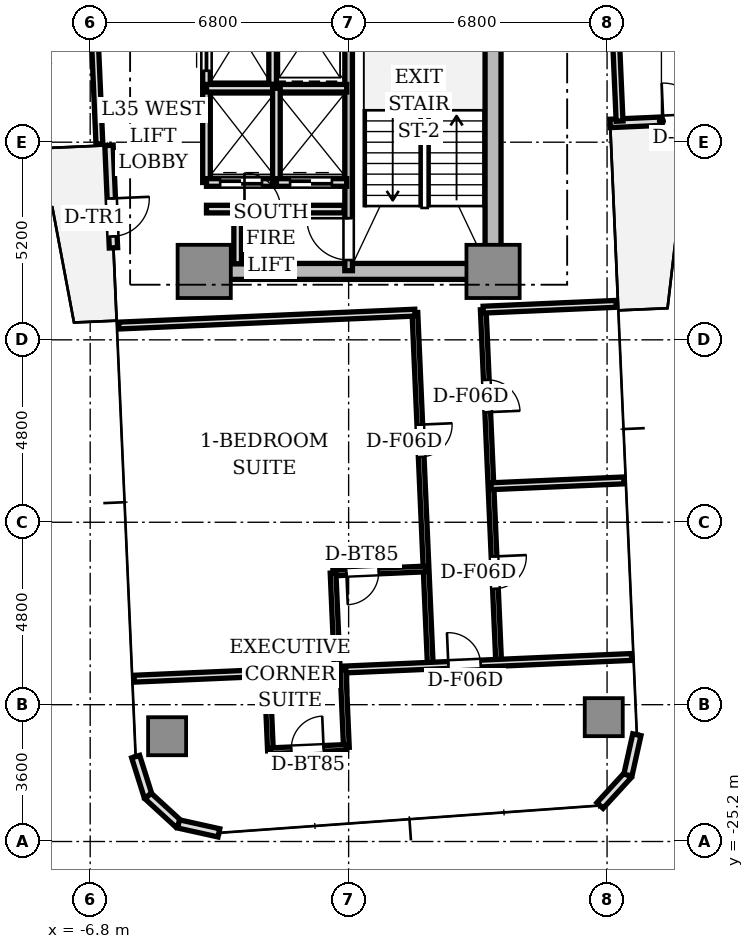
"""IFC4 building model, lengths in metres.
Left out: names, types, materials, properties, quantities, classifications, styles, units other than length and angle.
Written with IfcOpenShell. Run it as: python <this file> out.ifc"""

import sys

from ifc_helpers import new_model, si_unit, direction, frame, frame_2d, origin, origin_2d, place, context, subcontext, project, spatial, rectangle, extrude, source, transform, mapped, element, fill, save


model = new_model("IFC4")
c1 = context("Model", 3, precision=1e-05, world=origin(), true_north=direction((0.0, 1.0)))
c2 = subcontext(c1, "Body", "Model", "MODEL_VIEW")
j1 = project(units=[si_unit("LENGTHUNIT", "METRE"), si_unit("PLANEANGLEUNIT", "RADIAN")], contexts=[c1])
p1 = place(None, origin())
s1 = spatial("IfcSite", under=j1, at=p1, CompositionType="ELEMENT")
p2 = place(p1, origin())
s2 = spatial("IfcBuilding", under=s1, at=p2, CompositionType="ELEMENT")
p3 = place(p2, frame((0.0, 0.0, 128.2)))
s3 = spatial("IfcBuildingStorey", under=s2, at=p3, CompositionType="ELEMENT", Elevation=128.2)
p4 = place(p3, frame((-3.55, -10.2, 0.0), z_axis=(0.0, 0.0, 1.0), x_axis=(1.0, 0.0, 0.0)))
e1 = element("IfcWall", 1, at=p4, inside=s3, PredefinedType="SHEAR", context=c2, shape_type="SweptSolid", body=[
    extrude(rectangle(XDim=7.1, YDim=0.42, at=frame_2d((3.55, 0.0))), origin(), (0.0, 0.0, 1.0), 3.11),
])
p5 = place(p3, frame((3.8, -9.75, 0.0), z_axis=(0.0, 0.0, 1.0), x_axis=(0.0, 1.0, 0.0)))
e2 = element("IfcWall", 2, at=p5, inside=s3, PredefinedType="SHEAR", context=c2, shape_type="SweptSolid", body=[
    extrude(rectangle(XDim=6.9, YDim=0.42, at=frame_2d((3.45, 0.0))), origin(), (0.0, 0.0, 1.0), 3.11),
])
m1 = source(origin(), c2, "Body", "SweptSolid", [
    extrude(rectangle(XDim=1.4, YDim=1.4, at=origin_2d()), origin(), (0.0, 0.0, 1.0), 3.11),
])
for number, where, z_axis, x_axis in (
    (3, (-3.8, -10.2, 0.0), (0.0, 0.0, 1.0), (1.0, 0.0, 0.0)),
    (4, (3.8, -10.2, 0.0), (0.0, 0.0, 1.0), (1.0, 0.0, 0.0)),
):
    element("IfcColumn", number, at=place(p3, frame(where, z_axis=z_axis, x_axis=x_axis)), inside=s3, PredefinedType="COLUMN", context=c2, shape_type="MappedRepresentation", body=[
        mapped(m1, transform((0.0, 0.0, 0.0), scale=1.0)),
    ])
m2 = source(origin(), c2, "Body", "SweptSolid", [
    extrude(rectangle(XDim=1.0, YDim=1.0, at=origin_2d()), origin(), (0.0, 0.0, 1.0), 3.11),
])
for number, where, z_axis, x_axis in (
    (5, (-4.776, -22.43, 0.0), (0.0, 0.0, 1.0), (1.0, 0.0, 0.0)),
    (6, (6.713, -21.928, 0.0), (0.0, 0.0, 1.0), (1.0, 0.0, 0.0)),
):
    element("IfcColumn", number, at=place(p3, frame(where, z_axis=z_axis, x_axis=x_axis)), inside=s3, PredefinedType="COLUMN", context=c2, shape_type="MappedRepresentation", body=[
        mapped(m2, transform((0.0, 0.0, 0.0), scale=1.0)),
    ])
p6 = place(p3, frame((6.882, -6.306, 0.0), z_axis=(0.0, 0.0, 1.0), x_axis=(0.999045894436, 0.043672655174, 0.0)))
e7 = element("IfcWall", 7, at=p6, inside=s3, PredefinedType="STANDARD", context=c2, shape_type="SweptSolid", body=[
    extrude(rectangle(XDim=2.7, YDim=0.22, at=frame_2d((1.35, 0.0))), origin(), (0.0, 0.0, 1.0), 3.11),
])
p7 = place(p6, frame((1.4, 0.0, 0.0)))
e8 = element("IfcOpeningElement", 8, at=p7, cuts=e7, PredefinedType="OPENING", context=c2, shape_type="SweptSolid", body=[
    extrude(rectangle(XDim=1.0, YDim=2.2, at=frame_2d((0.5, 1.1))), frame((0.0, 0.12, 0.0), z_axis=(0.0, -1.0, 0.0), x_axis=(1.0, 0.0, 0.0)), (0.0, 0.0, 1.0), 0.24),
])
p8 = place(p3, frame((-6.306, -6.882, 0.0), z_axis=(0.0, 0.0, 1.0), x_axis=(0.043672655174, -0.999045894436, 0.0)))
e9 = element("IfcWall", 9, at=p8, inside=s3, PredefinedType="STANDARD", context=c2, shape_type="SweptSolid", body=[
    extrude(rectangle(XDim=2.7, YDim=0.22, at=frame_2d((1.35, 0.0))), origin(), (0.0, 0.0, 1.0), 3.11),
])
p9 = place(p8, frame((1.4, 0.0, 0.0)))
e10 = element("IfcOpeningElement", 10, at=p9, cuts=e9, PredefinedType="OPENING", context=c2, shape_type="SweptSolid", body=[
    extrude(rectangle(XDim=1.0, YDim=2.2, at=frame_2d((0.5, 1.1))), frame((0.0, 0.12, 0.0), z_axis=(0.0, -1.0, 0.0), x_axis=(1.0, 0.0, 0.0)), (0.0, 0.0, 1.0), 0.24),
])
p10 = place(p3, frame((-5.604, -22.966, 0.0), z_axis=(0.0, 0.0, 1.0), x_axis=(0.300755105707, -0.953701403161, 0.0)))
e11 = element("IfcWall", 11, at=p10, inside=s3, PredefinedType="STANDARD", context=c2, shape_type="SweptSolid", body=[
    extrude(rectangle(XDim=1.087, YDim=0.22, at=frame_2d((0.543, 0.0))), origin(), (0.0, 0.0, 1.0), 3.11),
])
p11 = place(p3, frame((-5.277, -24.003, 0.0), z_axis=(0.0, 0.0, 1.0), x_axis=(0.737312600672, -0.675551721847, 0.0)))
e12 = element("IfcWall", 12, at=p11, inside=s3, PredefinedType="STANDARD", context=c2, shape_type="SweptSolid", body=[
    extrude(rectangle(XDim=1.087, YDim=0.22, at=frame_2d((0.543, 0.0))), origin(), (0.0, 0.0, 1.0), 3.11),
])
for number, where, z_axis, x_axis in (
    (13, (-4.475, -24.737, 0.0), (0.0, 0.0, 1.0), (0.976, -0.217, 0.0)),
    (14, (6.614, -24.253, 0.0), (0.0, 0.0, 1.0), (0.676, 0.737, 0.0)),
):
    element("IfcWall", number, at=place(p3, frame(where, z_axis=z_axis, x_axis=x_axis)), inside=s3, PredefinedType="STANDARD", context=c2, shape_type="SweptSolid", body=[
        extrude(rectangle(XDim=1.087, YDim=0.22, at=frame_2d((0.543, 0.0))), origin(), (0.0, 0.0, 1.0), 3.11),
    ])
p12 = place(p3, frame((7.349, -23.452, 0.0), z_axis=(0.0, 0.0, 1.0), x_axis=(0.216454939174, 0.976292609471, 0.0)))
e15 = element("IfcWall", 15, at=p12, inside=s3, PredefinedType="STANDARD", context=c2, shape_type="SweptSolid", body=[
    extrude(rectangle(XDim=1.087, YDim=0.22, at=frame_2d((0.544, 0.0))), origin(), (0.0, 0.0, 1.0), 3.11),
])
p13 = place(p3, frame((0.0, -10.18, 0.0), z_axis=(0.0, 0.0, 1.0), x_axis=(0.0, 1.0, 0.0)))
e16 = element("IfcWall", 16, at=p13, inside=s3, PredefinedType="SOLIDWALL", context=c2, shape_type="SweptSolid", body=[
    extrude(rectangle(XDim=7.68, YDim=0.2, at=frame_2d((3.84, 0.0))), origin(), (0.0, 0.0, 1.0), 3.11),
])
p14 = place(p13, frame((0.28, 0.0, 0.0)))
e17 = element("IfcOpeningElement", 17, at=p14, cuts=e16, PredefinedType="OPENING", context=c2, shape_type="SweptSolid", body=[
    extrude(rectangle(XDim=1.1, YDim=2.15, at=frame_2d((0.55, 1.075))), frame((0.0, 0.11, 0.0), z_axis=(0.0, -1.0, 0.0), x_axis=(1.0, 0.0, 0.0)), (0.0, 0.0, 1.0), 0.22),
])
p15 = place(p3, frame((-2.0, -5.28, 0.0), z_axis=(0.0, 0.0, 1.0), x_axis=(0.0, 1.0, 0.0)))
e18 = element("IfcWall", 18, at=p15, inside=s3, PredefinedType="SOLIDWALL", context=c2, shape_type="SweptSolid", body=[
    extrude(rectangle(XDim=2.78, YDim=0.2, at=frame_2d((1.39, 0.0))), origin(), (0.0, 0.0, 1.0), 2.66),
])
p16 = place(p3, frame((-3.74, -5.36, 0.0), z_axis=(0.0, 0.0, 1.0), x_axis=(0.0, 1.0, 0.0)))
e19 = element("IfcWall", 19, at=p16, inside=s3, PredefinedType="SOLIDWALL", context=c2, shape_type="SweptSolid", body=[
    extrude(rectangle(XDim=2.08, YDim=0.2, at=frame_2d((1.04, 0.0))), origin(), (0.0, 0.0, 1.0), 2.66),
])
p17 = place(p16, frame((0.44, 0.0, 0.0)))
e20 = element("IfcOpeningElement", 20, at=p17, cuts=e19, PredefinedType="OPENING", context=c2, shape_type="SweptSolid", body=[
    extrude(rectangle(XDim=1.2, YDim=2.2, at=frame_2d((0.6, 1.1))), frame((0.0, 0.11, 0.0), z_axis=(0.0, -1.0, 0.0), x_axis=(1.0, 0.0, 0.0)), (0.0, 0.0, 1.0), 0.22),
])
p18 = place(p3, frame((-3.74, -7.86, 0.0), z_axis=(0.0, 0.0, 1.0), x_axis=(0.0, 1.0, 0.0)))
e21 = element("IfcWall", 21, at=p18, inside=s3, PredefinedType="SOLIDWALL", context=c2, shape_type="SweptSolid", body=[
    extrude(rectangle(XDim=2.48, YDim=0.2, at=frame_2d((1.24, 0.0))), origin(), (0.0, 0.0, 1.0), 2.66),
])
p19 = place(p3, frame((-3.74, -7.86, 0.0), z_axis=(0.0, 0.0, 1.0), x_axis=(1.0, 0.0, 0.0)))
e22 = element("IfcWall", 22, at=p19, inside=s3, PredefinedType="SOLIDWALL", context=c2, shape_type="SweptSolid", body=[
    extrude(rectangle(XDim=1.84, YDim=0.2, at=frame_2d((0.92, 0.0))), origin(), (0.0, 0.0, 1.0), 2.66),
])
p20 = place(p19, frame((0.36, 0.0, 0.0)))
e23 = element("IfcOpeningElement", 23, at=p20, cuts=e22, PredefinedType="OPENING", context=c2, shape_type="SweptSolid", body=[
    extrude(rectangle(XDim=1.1, YDim=2.2, at=frame_2d((0.55, 1.1))), frame((0.0, 0.11, 0.0), z_axis=(0.0, -1.0, 0.0), x_axis=(1.0, 0.0, 0.0)), (0.0, 0.0, 1.0), 0.22),
])
p21 = place(p3, frame((-3.74, -5.38, 0.0), z_axis=(0.0, 0.0, 1.0), x_axis=(1.0, 0.0, 0.0)))
e24 = element("IfcWall", 24, at=p21, inside=s3, PredefinedType="SOLIDWALL", context=c2, shape_type="SweptSolid", body=[
    extrude(rectangle(XDim=3.69, YDim=0.2, at=frame_2d((1.845, 0.0))), origin(), (0.0, 0.0, 1.0), 2.66),
])
p22 = place(p3, frame((-1.9, -7.86, 0.0), z_axis=(0.0, 0.0, 1.0), x_axis=(0.0, 1.0, 0.0)))
e25 = element("IfcWall", 25, at=p22, inside=s3, PredefinedType="SOLIDWALL", context=c2, shape_type="SweptSolid", body=[
    extrude(rectangle(XDim=2.48, YDim=0.2, at=frame_2d((1.24, 0.0))), origin(), (0.0, 0.0, 1.0), 2.66),
])
p23 = place(p3, frame((-1.9, -7.86, 0.0), z_axis=(0.0, 0.0, 1.0), x_axis=(1.0, 0.0, 0.0)))
e26 = element("IfcWall", 26, at=p23, inside=s3, PredefinedType="SOLIDWALL", context=c2, shape_type="SweptSolid", body=[
    extrude(rectangle(XDim=1.85, YDim=0.2, at=frame_2d((0.925, 0.0))), origin(), (0.0, 0.0, 1.0), 2.66),
])
p24 = place(p23, frame((0.36, 0.0, 0.0)))
e27 = element("IfcOpeningElement", 27, at=p24, cuts=e26, PredefinedType="OPENING", context=c2, shape_type="SweptSolid", body=[
    extrude(rectangle(XDim=1.1, YDim=2.2, at=frame_2d((0.55, 1.1))), frame((0.0, 0.11, 0.0), z_axis=(0.0, -1.0, 0.0), x_axis=(1.0, 0.0, 0.0)), (0.0, 0.0, 1.0), 0.22),
])
p25 = place(p3, frame((-3.74, -8.56, 0.0), z_axis=(0.0, 0.0, 1.0), x_axis=(1.0, 0.0, 0.0)))
e28 = element("IfcWall", 28, at=p25, inside=s3, PredefinedType="SOLIDWALL", context=c2, shape_type="SweptSolid", body=[
    extrude(rectangle(XDim=3.62, YDim=0.2, at=frame_2d((1.81, 0.0))), origin(), (0.0, 0.0, 1.0), 2.66),
])
p26 = place(p25, frame((1.0, 0.0, 0.0)))
e29 = element("IfcOpeningElement", 29, at=p26, cuts=e28, PredefinedType="OPENING", context=c2, shape_type="SweptSolid", body=[
    extrude(rectangle(XDim=0.95, YDim=2.15, at=frame_2d((0.475, 1.075))), frame((0.0, 0.11, 0.0), z_axis=(0.0, -1.0, 0.0), x_axis=(1.0, 0.0, 0.0)), (0.0, 0.0, 1.0), 0.22),
])
p27 = place(p3, frame((-2.92, -10.0, 0.0), z_axis=(0.0, 0.0, 1.0), x_axis=(0.0, 1.0, 0.0)))
e30 = element("IfcWall", 30, at=p27, inside=s3, PredefinedType="SOLIDWALL", context=c2, shape_type="SweptSolid", body=[
    extrude(rectangle(XDim=1.44, YDim=0.2, at=frame_2d((0.72, 0.0))), origin(), (0.0, 0.0, 1.0), 2.66),
])
p28 = place(p3, frame((7.129, -6.245, 0.0), z_axis=(0.0, 0.0, 1.0), x_axis=(-0.043600217373, 0.999049058378, 0.0)))
e31 = element("IfcWall", 31, at=p28, inside=s3, PredefinedType="PARTITIONING", context=c2, shape_type="SweptSolid", body=[
    extrude(rectangle(XDim=7.8, YDim=0.18, at=frame_2d((3.9, 0.0))), origin(), (0.0, 0.0, 1.0), 2.66),
])
p29 = place(p3, frame((-6.71, -3.346, 0.0), z_axis=(0.0, 0.0, 1.0), x_axis=(0.043597663116, -0.999049169846, 0.0)))
e32 = element("IfcWall", 32, at=p29, inside=s3, PredefinedType="PARTITIONING", context=c2, shape_type="SweptSolid", body=[
    extrude(rectangle(XDim=3.5, YDim=0.18, at=frame_2d((1.75, 0.0))), origin(), (0.0, 0.0, 1.0), 2.66),
])
p30 = place(p3, frame((3.542, -11.206, 0.0), z_axis=(0.0, 0.0, 1.0), x_axis=(0.043604692074, -0.999048863084, 0.0)))
e33 = element("IfcWall", 33, at=p30, inside=s3, PredefinedType="PARTITIONING", context=c2, shape_type="SweptSolid", body=[
    extrude(rectangle(XDim=9.3, YDim=0.15, at=frame_2d((4.65, 0.0))), origin(), (0.0, 0.0, 1.0), 2.66),
])
p31 = place(p30, frame((1.85, 0.0, 0.0)))
e34 = element("IfcOpeningElement", 34, at=p31, cuts=e33, PredefinedType="OPENING", context=c2, shape_type="SweptSolid", body=[
    extrude(rectangle(XDim=0.85, YDim=2.1, at=frame_2d((0.425, 1.05))), frame((0.0, 0.085, 0.0), z_axis=(0.0, -1.0, 0.0), x_axis=(1.0, 0.0, 0.0)), (0.0, 0.0, 1.0), 0.17),
])
p32 = place(p30, frame((6.5, 0.0, 0.0)))
e35 = element("IfcOpeningElement", 35, at=p32, cuts=e33, PredefinedType="OPENING", context=c2, shape_type="SweptSolid", body=[
    extrude(rectangle(XDim=0.85, YDim=2.1, at=frame_2d((0.425, 1.05))), frame((0.0, 0.085, 0.0), z_axis=(0.0, -1.0, 0.0), x_axis=(1.0, 0.0, 0.0)), (0.0, 0.0, 1.0), 0.17),
])
p33 = place(p3, frame((1.744, -11.285, 0.0), z_axis=(0.0, 0.0, 1.0), x_axis=(0.043630894187, -0.999047719117, 0.0)))
e36 = element("IfcWall", 36, at=p33, inside=s3, PredefinedType="PARTITIONING", context=c2, shape_type="SweptSolid", body=[
    extrude(rectangle(XDim=9.3, YDim=0.15, at=frame_2d((4.65, 0.0))), origin(), (0.0, 0.0, 1.0), 2.66),
])
p34 = place(p33, frame((2.95, 0.0, 0.0)))
e37 = element("IfcOpeningElement", 37, at=p34, cuts=e36, PredefinedType="OPENING", context=c2, shape_type="SweptSolid", body=[
    extrude(rectangle(XDim=0.85, YDim=2.1, at=frame_2d((0.425, 1.05))), frame((0.0, 0.085, 0.0), z_axis=(0.0, -1.0, 0.0), x_axis=(1.0, 0.0, 0.0)), (0.0, 0.0, 1.0), 0.17),
])
p35 = place(p3, frame((3.542, -11.206, 0.0), z_axis=(0.0, 0.0, 1.0), x_axis=(0.999046129111, 0.04366728647, 0.0)))
e38 = element("IfcWall", 38, at=p35, inside=s3, PredefinedType="PARTITIONING", context=c2, shape_type="SweptSolid", body=[
    extrude(rectangle(XDim=3.5, YDim=0.18, at=frame_2d((1.75, 0.0))), origin(), (0.0, 0.0, 1.0), 2.66),
])
p36 = place(p3, frame((-6.049, -11.625, 0.0), z_axis=(0.0, 0.0, 1.0), x_axis=(0.999047634936, 0.043632821702, 0.0)))
e39 = element("IfcWall", 39, at=p36, inside=s3, PredefinedType="PARTITIONING", context=c2, shape_type="SweptSolid", body=[
    extrude(rectangle(XDim=7.8, YDim=0.18, at=frame_2d((3.9, 0.0))), origin(), (0.0, 0.0, 1.0), 2.66),
])
p37 = place(p3, frame((3.745, -15.852, 0.0), z_axis=(0.0, 0.0, 1.0), x_axis=(0.999049169846, 0.043597663116, 0.0)))
e40 = element("IfcWall", 40, at=p37, inside=s3, PredefinedType="PARTITIONING", context=c2, shape_type="SweptSolid", body=[
    extrude(rectangle(XDim=3.5, YDim=0.18, at=frame_2d((1.75, 0.0))), origin(), (0.0, 0.0, 1.0), 2.66),
])
p38 = place(p3, frame((2.038, -18.028, 0.0), z_axis=(0.0, 0.0, 1.0), x_axis=(-0.999051263243, -0.043549666039, 0.0)))
e41 = element("IfcWall", 41, at=p38, inside=s3, PredefinedType="PARTITIONING", context=c2, shape_type="SweptSolid", body=[
    extrude(rectangle(XDim=2.45, YDim=0.15, at=frame_2d((1.225, 0.0))), origin(), (0.0, 0.0, 1.0), 2.66),
])
p39 = place(p38, frame((1.25, 0.0, 0.0)))
e42 = element("IfcOpeningElement", 42, at=p39, cuts=e41, PredefinedType="OPENING", context=c2, shape_type="SweptSolid", body=[
    extrude(rectangle(XDim=0.85, YDim=2.1, at=frame_2d((0.425, 1.05))), frame((0.0, 0.085, 0.0), z_axis=(0.0, -1.0, 0.0), x_axis=(1.0, 0.0, 0.0)), (0.0, 0.0, 1.0), 0.17),
])
p40 = place(p3, frame((-0.409, -18.135, 0.0), z_axis=(0.0, 0.0, 1.0), x_axis=(0.043561867058, -0.999050731314, 0.0)))
e43 = element("IfcWall", 43, at=p40, inside=s3, PredefinedType="PARTITIONING", context=c2, shape_type="SweptSolid", body=[
    extrude(rectangle(XDim=2.55, YDim=0.15, at=frame_2d((1.275, 0.0))), origin(), (0.0, 0.0, 1.0), 2.66),
])
p41 = place(p3, frame((-5.643, -20.916, 0.0), z_axis=(0.0, 0.0, 1.0), x_axis=(0.999047841598, 0.043628089563, 0.0)))
e44 = element("IfcWall", 44, at=p41, inside=s3, PredefinedType="PARTITIONING", context=c2, shape_type="SweptSolid", body=[
    extrude(rectangle(XDim=13.1, YDim=0.18, at=frame_2d((6.55, 0.0))), origin(), (0.0, 0.0, 1.0), 2.66),
])
p42 = place(p41, frame((8.275, 0.0, 0.0)))
e45 = element("IfcOpeningElement", 45, at=p42, cuts=e44, PredefinedType="OPENING", context=c2, shape_type="SweptSolid", body=[
    extrude(rectangle(XDim=0.85, YDim=2.1, at=frame_2d((0.425, 1.05))), frame((0.0, 0.1, 0.0), z_axis=(0.0, -1.0, 0.0), x_axis=(1.0, 0.0, 0.0)), (0.0, 0.0, 1.0), 0.2),
])
p43 = place(p3, frame((-0.148, -20.676, 0.0), z_axis=(0.0, 0.0, 1.0), x_axis=(0.043587097972, -0.999049630844, 0.0)))
e46 = element("IfcWall", 46, at=p43, inside=s3, PredefinedType="PARTITIONING", context=c2, shape_type="SweptSolid", body=[
    extrude(rectangle(XDim=2.05, YDim=0.15, at=frame_2d((1.025, 0.0))), origin(), (0.0, 0.0, 1.0), 2.66),
])
p44 = place(p3, frame((-2.146, -20.763, 0.0), z_axis=(0.0, 0.0, 1.0), x_axis=(0.043711161805, -0.9990442104, 0.0)))
e47 = element("IfcWall", 47, at=p44, inside=s3, PredefinedType="PARTITIONING", context=c2, shape_type="SweptSolid", body=[
    extrude(rectangle(XDim=2.05, YDim=0.15, at=frame_2d((1.025, 0.0))), origin(), (0.0, 0.0, 1.0), 2.66),
])
p45 = place(p3, frame((-2.057, -22.811, 0.0), z_axis=(0.0, 0.0, 1.0), x_axis=(0.999049929275, 0.043580257179, 0.0)))
e48 = element("IfcWall", 48, at=p45, inside=s3, PredefinedType="PARTITIONING", context=c2, shape_type="SweptSolid", body=[
    extrude(rectangle(XDim=2.0, YDim=0.15, at=frame_2d((1.0, 0.0))), origin(), (0.0, 0.0, 1.0), 2.66),
])
p46 = place(p45, frame((0.55, 0.0, 0.0)))
e49 = element("IfcOpeningElement", 49, at=p46, cuts=e48, PredefinedType="OPENING", context=c2, shape_type="SweptSolid", body=[
    extrude(rectangle(XDim=0.85, YDim=2.1, at=frame_2d((0.425, 1.05))), frame((0.0, 0.085, 0.0), z_axis=(0.0, -1.0, 0.0), x_axis=(1.0, 0.0, 0.0)), (0.0, 0.0, 1.0), 0.17),
])
m3 = source(origin(), c2, "Body", "SweptSolid", [
    extrude(rectangle(XDim=1.0, YDim=0.05, at=origin_2d()), origin(), (0.0, 0.0, 1.0), 2.2),
])
p47 = place(p7, frame((0.5, 0.0, 0.0)))
e50 = element("IfcDoor", 50, at=p47, inside=s3, OperationType="SINGLE_SWING_LEFT", PredefinedType="DOOR", context=c2, shape_type="MappedRepresentation", body=[
    mapped(m3, transform((0.0, 0.0, 0.0), scale=1.0)),
])
fill(e8, e50)
p48 = place(p9, frame((0.5, 0.0, 0.0)))
e51 = element("IfcDoor", 51, at=p48, inside=s3, OperationType="SINGLE_SWING_LEFT", PredefinedType="DOOR", context=c2, shape_type="MappedRepresentation", body=[
    mapped(m3, transform((0.0, 0.0, 0.0), scale=1.0)),
])
fill(e10, e51)
m4 = source(origin(), c2, "Body", "SweptSolid", [
    extrude(rectangle(XDim=1.2, YDim=0.05, at=origin_2d()), origin(), (0.0, 0.0, 1.0), 2.2),
])
p49 = place(p17, frame((0.6, 0.0, 0.0)))
e52 = element("IfcDoor", 52, at=p49, inside=s3, OperationType="DOUBLE_DOOR_SLIDING", PredefinedType="DOOR", context=c2, shape_type="MappedRepresentation", body=[
    mapped(m4, transform((0.0, 0.0, 0.0), scale=1.0)),
])
fill(e20, e52)
m5 = source(origin(), c2, "Body", "SweptSolid", [
    extrude(rectangle(XDim=1.1, YDim=0.05, at=origin_2d()), origin(), (0.0, 0.0, 1.0), 2.2),
])
p50 = place(p20, frame((0.55, 0.0, 0.0)))
e53 = element("IfcDoor", 53, at=p50, inside=s3, OperationType="DOUBLE_DOOR_SLIDING", PredefinedType="DOOR", context=c2, shape_type="MappedRepresentation", body=[
    mapped(m5, transform((0.0, 0.0, 0.0), scale=1.0)),
])
fill(e23, e53)
p51 = place(p24, frame((0.55, 0.0, 0.0)))
e54 = element("IfcDoor", 54, at=p51, inside=s3, OperationType="DOUBLE_DOOR_SLIDING", PredefinedType="DOOR", context=c2, shape_type="MappedRepresentation", body=[
    mapped(m5, transform((0.0, 0.0, 0.0), scale=1.0)),
])
fill(e27, e54)
m6 = source(origin(), c2, "Body", "SweptSolid", [
    extrude(rectangle(XDim=1.1, YDim=0.05, at=origin_2d()), origin(), (0.0, 0.0, 1.0), 2.15),
])
p52 = place(p14, frame((0.55, 0.0, 0.0)))
e55 = element("IfcDoor", 55, at=p52, inside=s3, OperationType="SINGLE_SWING_RIGHT", PredefinedType="DOOR", context=c2, shape_type="MappedRepresentation", body=[
    mapped(m6, transform((0.0, 0.0, 0.0), scale=1.0)),
])
fill(e17, e55)
m7 = source(origin(), c2, "Body", "SweptSolid", [
    extrude(rectangle(XDim=0.95, YDim=0.05, at=origin_2d()), origin(), (0.0, 0.0, 1.0), 2.15),
])
p53 = place(p26, frame((0.475, 0.0, 0.0)))
e56 = element("IfcDoor", 56, at=p53, inside=s3, OperationType="SINGLE_SWING_LEFT", PredefinedType="DOOR", context=c2, shape_type="MappedRepresentation", body=[
    mapped(m7, transform((0.0, 0.0, 0.0), scale=1.0)),
])
fill(e29, e56)
m8 = source(origin(), c2, "Body", "SweptSolid", [
    extrude(rectangle(XDim=0.85, YDim=0.05, at=origin_2d()), origin(), (0.0, 0.0, 1.0), 2.1),
])
p54 = place(p31, frame((0.425, 0.0, 0.0)))
e57 = element("IfcDoor", 57, at=p54, inside=s3, OperationType="SINGLE_SWING_RIGHT", PredefinedType="DOOR", context=c2, shape_type="MappedRepresentation", body=[
    mapped(m8, transform((0.0, 0.0, 0.0), scale=1.0)),
])
fill(e34, e57)
p55 = place(p32, frame((0.425, 0.0, 0.0)))
e58 = element("IfcDoor", 58, at=p55, inside=s3, OperationType="SINGLE_SWING_LEFT", PredefinedType="DOOR", context=c2, shape_type="MappedRepresentation", body=[
    mapped(m8, transform((0.0, 0.0, 0.0), scale=1.0)),
])
fill(e35, e58)
p56 = place(p39, frame((0.425, 0.0, 0.0)))
e59 = element("IfcDoor", 59, at=p56, inside=s3, OperationType="SINGLE_SWING_RIGHT", PredefinedType="DOOR", context=c2, shape_type="MappedRepresentation", body=[
    mapped(m8, transform((0.0, 0.0, 0.0), scale=1.0)),
])
fill(e42, e59)
p57 = place(p34, frame((0.425, 0.0, 0.0)))
e60 = element("IfcDoor", 60, at=p57, inside=s3, OperationType="SINGLE_SWING_LEFT", PredefinedType="DOOR", context=c2, shape_type="MappedRepresentation", body=[
    mapped(m8, transform((0.0, 0.0, 0.0), scale=1.0)),
])
fill(e37, e60)
p58 = place(p46, frame((0.425, 0.0, 0.0)))
e61 = element("IfcDoor", 61, at=p58, inside=s3, OperationType="SINGLE_SWING_RIGHT", PredefinedType="DOOR", context=c2, shape_type="MappedRepresentation", body=[
    mapped(m8, transform((0.0, 0.0, 0.0), scale=1.0)),
])
fill(e49, e61)
p59 = place(p42, frame((0.425, 0.0, 0.0)))
e62 = element("IfcDoor", 62, at=p59, inside=s3, OperationType="SINGLE_SWING_LEFT", PredefinedType="DOOR", context=c2, shape_type="MappedRepresentation", body=[
    mapped(m8, transform((0.0, 0.0, 0.0), scale=1.0)),
])
fill(e45, e62)
save(model, sys.argv[1])
